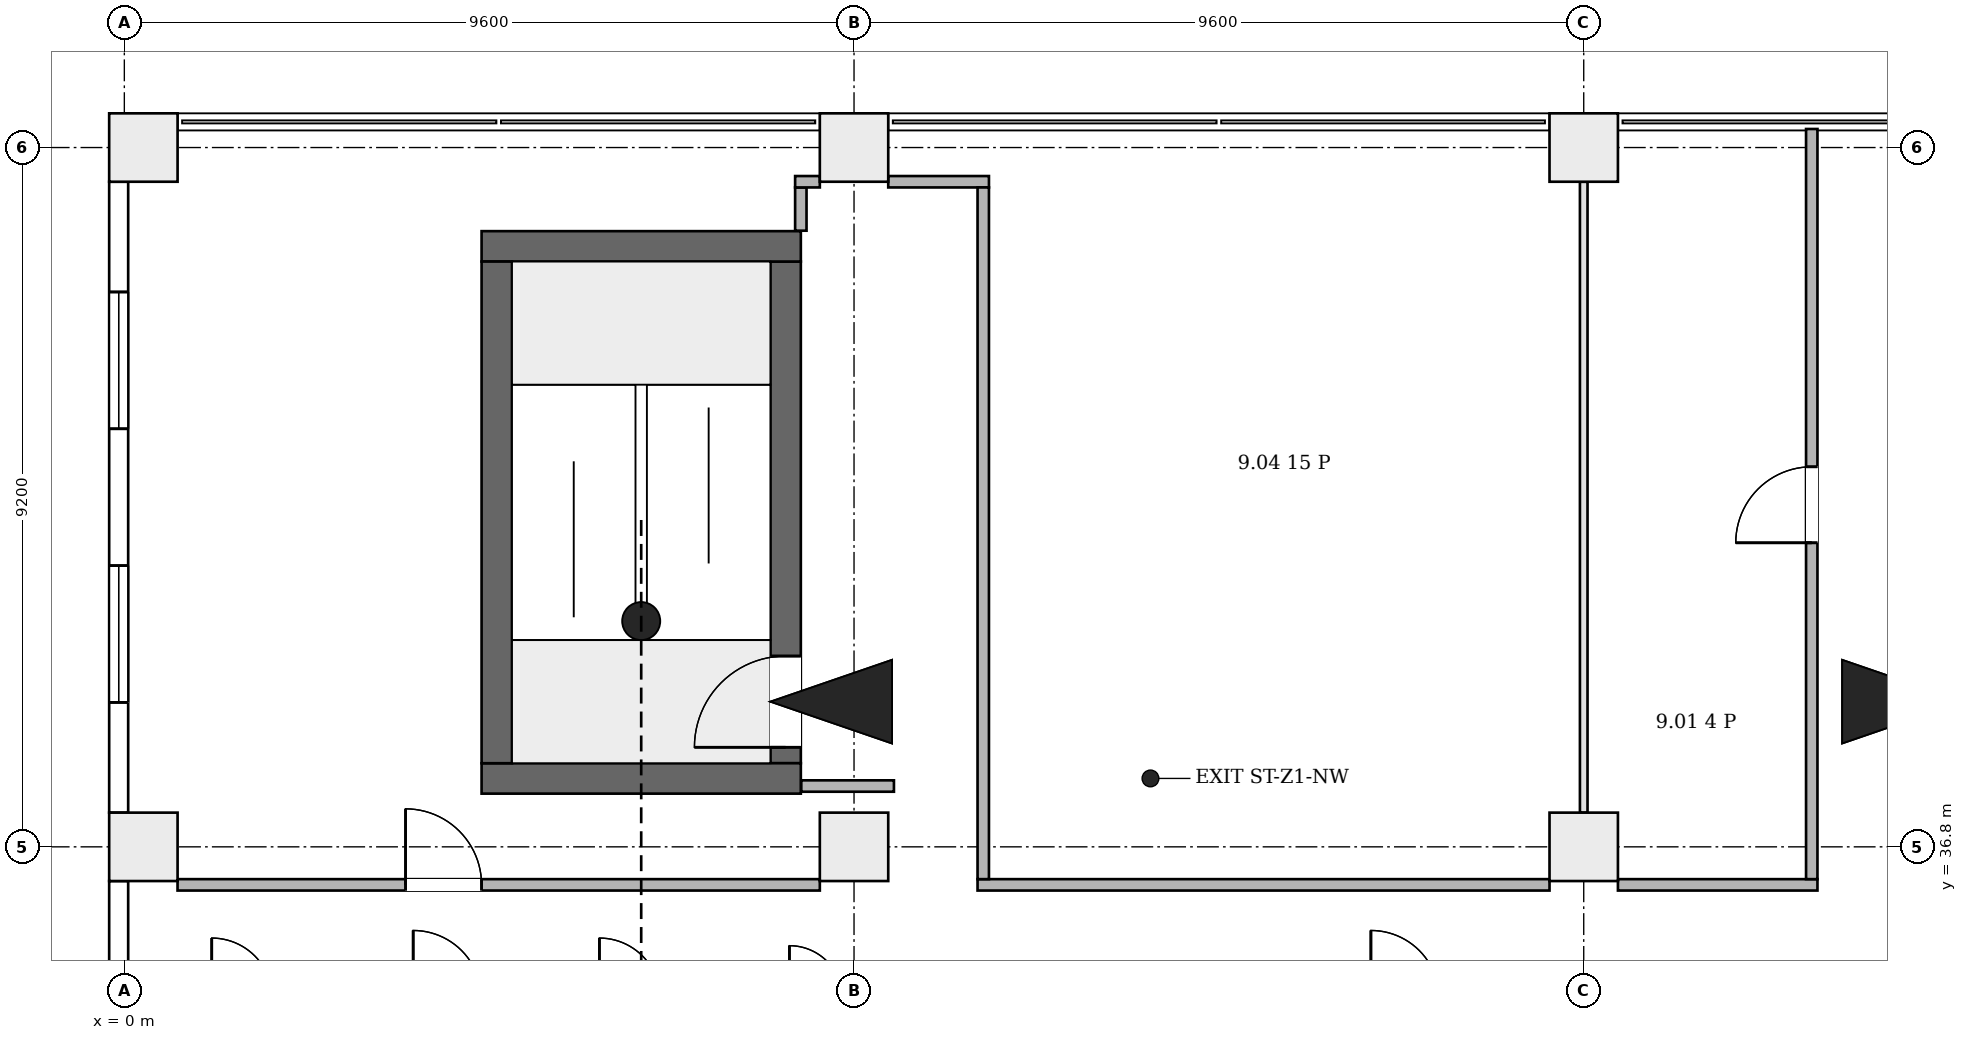
"""IFC4 building model, lengths in metres.
Left out: names, types, materials, properties, quantities, classifications, styles, units other than length and angle.
Written with IfcOpenShell. Run it as: python <this file> out.ifc"""

import sys

from ifc_helpers import new_model, si_unit, direction, frame, frame_2d, origin, origin_2d, place, context, subcontext, project, spatial, rectangle, extrude, element, fill, save


model = new_model("IFC4")
c1 = context("Model", 3, precision=1e-05, world=origin(), true_north=direction((0.0, 1.0)))
c2 = subcontext(c1, "Body", "Model", "MODEL_VIEW")
j1 = project(units=[si_unit("LENGTHUNIT", "METRE"), si_unit("PLANEANGLEUNIT", "RADIAN")], contexts=[c1])
p1 = place(None, origin())
s1 = spatial("IfcSite", under=j1, at=p1, CompositionType="ELEMENT")
p2 = place(p1, origin())
s2 = spatial("IfcBuilding", under=s1, at=p2, CompositionType="ELEMENT")
p3 = place(p2, frame((0.0, 0.0, 48.7)))
s3 = spatial("IfcBuildingStorey", under=s2, at=p3, CompositionType="ELEMENT", Elevation=48.7)
for number, where, z_axis, x_axis in (
    (1, (4.7, 37.7, 0.0), (0.0, 0.0, 1.0), (1.0, 0.0, 0.0)),
    (2, (4.7, 44.7, 0.0), (0.0, 0.0, 1.0), (1.0, 0.0, 0.0)),
):
    element("IfcWall", number, at=place(p3, frame(where, z_axis=z_axis, x_axis=x_axis)), inside=s3, PredefinedType="SHEAR", context=c2, shape_type="SweptSolid", body=[
        extrude(rectangle(XDim=4.2, YDim=0.4, at=frame_2d((2.1, 0.0))), origin(), (0.0, 0.0, 1.0), 4.2),
    ])
p4 = place(p3, frame((4.9, 37.9, 0.0), z_axis=(0.0, 0.0, 1.0), x_axis=(0.0, 1.0, 0.0)))
e3 = element("IfcWall", 3, at=p4, inside=s3, PredefinedType="SHEAR", context=c2, shape_type="SweptSolid", body=[
    extrude(rectangle(XDim=6.6, YDim=0.4, at=frame_2d((3.3, 0.0))), origin(), (0.0, 0.0, 1.0), 4.2),
])
p5 = place(p3, frame((8.7, 37.9, 0.0), z_axis=(0.0, 0.0, 1.0), x_axis=(0.0, 1.0, 0.0)))
e4 = element("IfcWall", 4, at=p5, inside=s3, PredefinedType="SHEAR", context=c2, shape_type="SweptSolid", body=[
    extrude(rectangle(XDim=6.6, YDim=0.4, at=frame_2d((3.3, 0.0))), origin(), (0.0, 0.0, 1.0), 4.2),
])
p6 = place(p5, frame((0.21, 0.0, 0.0)))
e5 = element("IfcOpeningElement", 5, at=p6, cuts=e4, PredefinedType="OPENING", context=c2, shape_type="SweptSolid", body=[
    extrude(rectangle(XDim=1.2, YDim=2.1, at=frame_2d((0.6, 1.05))), frame((0.0, 0.21, 0.0), z_axis=(0.0, -1.0, 0.0), x_axis=(1.0, 0.0, 0.0)), (0.0, 0.0, 1.0), 0.42),
])
for number, where, z_axis, x_axis in (
    (6, (0.25, 36.8, 0.0), (0.0, 0.0, 1.0), (1.0, 0.0, 0.0)),
    (7, (9.6, 36.8, 0.0), (0.0, 0.0, 1.0), (1.0, 0.0, 0.0)),
    (8, (19.2, 36.8, 0.0), (0.0, 0.0, 1.0), (1.0, 0.0, 0.0)),
    (9, (0.25, 46.0, 0.0), (0.0, 0.0, 1.0), (1.0, 0.0, 0.0)),
    (10, (9.6, 46.0, 0.0), (0.0, 0.0, 1.0), (1.0, 0.0, 0.0)),
    (11, (19.2, 46.0, 0.0), (0.0, 0.0, 1.0), (1.0, 0.0, 0.0)),
):
    element("IfcColumn", number, at=place(p3, frame(where, z_axis=z_axis, x_axis=x_axis)), inside=s3, PredefinedType="COLUMN", context=c2, shape_type="SweptSolid", body=[
        extrude(rectangle(XDim=0.9, YDim=0.9, at=origin_2d()), origin(), (0.0, 0.0, 1.0), 4.2),
    ])
p7 = place(p3, frame((-0.074, 36.35, 0.0), z_axis=(0.0, 0.0, 1.0), x_axis=(0.0, -1.0, 0.0)))
e12 = element("IfcWall", 12, at=p7, inside=s3, PredefinedType="ELEMENTEDWALL", context=c2, shape_type="SweptSolid", body=[
    extrude(rectangle(XDim=8.3, YDim=0.25, at=frame_2d((4.15, 0.0))), origin(), (0.0, 0.0, 1.0), 3.9),
])
p8 = place(p7, frame((5.05, 0.0, 0.9)))
e13 = element("IfcOpeningElement", 13, at=p8, cuts=e12, PredefinedType="OPENING", context=c2, shape_type="SweptSolid", body=[
    extrude(rectangle(XDim=1.8, YDim=2.6, at=frame_2d((0.9, 1.3))), frame((0.0, 0.135, 0.0), z_axis=(0.0, -1.0, 0.0), x_axis=(1.0, 0.0, 0.0)), (0.0, 0.0, 1.0), 0.27),
])
p9 = place(p7, frame((1.7, 0.0, 0.9)))
e14 = element("IfcOpeningElement", 14, at=p9, cuts=e12, PredefinedType="OPENING", context=c2, shape_type="SweptSolid", body=[
    extrude(rectangle(XDim=1.8, YDim=2.6, at=frame_2d((0.9, 1.3))), frame((0.0, 0.135, 0.0), z_axis=(0.0, -1.0, 0.0), x_axis=(1.0, 0.0, 0.0)), (0.0, 0.0, 1.0), 0.27),
])
p10 = place(p3, frame((-0.074, 45.55, 0.0), z_axis=(0.0, 0.0, 1.0), x_axis=(0.0, -1.0, 0.0)))
e15 = element("IfcWall", 15, at=p10, inside=s3, PredefinedType="ELEMENTEDWALL", context=c2, shape_type="SweptSolid", body=[
    extrude(rectangle(XDim=8.3, YDim=0.25, at=frame_2d((4.15, 0.0))), origin(), (0.0, 0.0, 1.0), 3.9),
])
p11 = place(p10, frame((5.05, 0.0, 0.9)))
e16 = element("IfcOpeningElement", 16, at=p11, cuts=e15, PredefinedType="OPENING", context=c2, shape_type="SweptSolid", body=[
    extrude(rectangle(XDim=1.8, YDim=2.6, at=frame_2d((0.9, 1.3))), frame((0.0, 0.135, 0.0), z_axis=(0.0, -1.0, 0.0), x_axis=(1.0, 0.0, 0.0)), (0.0, 0.0, 1.0), 0.27),
])
p12 = place(p10, frame((1.45, 0.0, 0.9)))
e17 = element("IfcOpeningElement", 17, at=p12, cuts=e15, PredefinedType="OPENING", context=c2, shape_type="SweptSolid", body=[
    extrude(rectangle(XDim=1.8, YDim=2.6, at=frame_2d((0.9, 1.3))), frame((0.0, 0.135, 0.0), z_axis=(0.0, -1.0, 0.0), x_axis=(1.0, 0.0, 0.0)), (0.0, 0.0, 1.0), 0.27),
])
p13 = place(p3, frame((0.7, 36.3, 0.0), z_axis=(0.0, 0.0, 1.0), x_axis=(1.0, 0.0, 0.0)))
e18 = element("IfcWall", 18, at=p13, inside=s3, PredefinedType="PARTITIONING", context=c2, shape_type="SweptSolid", body=[
    extrude(rectangle(XDim=8.45, YDim=0.15, at=frame_2d((4.225, 0.0))), origin(), (0.0, 0.0, 1.0), 3.9),
])
p14 = place(p13, frame((3.0, 0.0, 0.0)))
e19 = element("IfcOpeningElement", 19, at=p14, cuts=e18, PredefinedType="OPENING", context=c2, shape_type="SweptSolid", body=[
    extrude(rectangle(XDim=1.0, YDim=2.1, at=frame_2d((0.5, 1.05))), frame((0.0, 0.085, 0.0), z_axis=(0.0, -1.0, 0.0), x_axis=(1.0, 0.0, 0.0)), (0.0, 0.0, 1.0), 0.17),
])
p15 = place(p3, frame((8.9, 44.906, 0.0), z_axis=(0.0, 0.0, 1.0), x_axis=(0.0, 1.0, 0.0)))
e20 = element("IfcWall", 20, at=p15, inside=s3, PredefinedType="PARTITIONING", context=c2, shape_type="SweptSolid", body=[
    extrude(rectangle(XDim=0.569, YDim=0.15, at=frame_2d((0.285, 0.0))), origin(), (0.0, 0.0, 1.0), 3.9),
])
p16 = place(p3, frame((8.825, 45.55, 0.0), z_axis=(0.0, 0.0, 1.0), x_axis=(1.0, 0.0, 0.0)))
e21 = element("IfcWall", 21, at=p16, inside=s3, PredefinedType="PARTITIONING", context=c2, shape_type="SweptSolid", body=[
    extrude(rectangle(XDim=0.325, YDim=0.15, at=frame_2d((0.163, 0.0))), origin(), (0.0, 0.0, 1.0), 3.9),
])
p17 = place(p3, frame((8.906, 37.6, 0.0), z_axis=(0.0, 0.0, 1.0), x_axis=(1.0, 0.0, 0.0)))
e22 = element("IfcWall", 22, at=p17, inside=s3, PredefinedType="PARTITIONING", context=c2, shape_type="SweptSolid", body=[
    extrude(rectangle(XDim=1.219, YDim=0.15, at=frame_2d((0.609, 0.0))), origin(), (0.0, 0.0, 1.0), 3.9),
])
p18 = place(p3, frame((10.05, 45.55, 0.0), z_axis=(0.0, 0.0, 1.0), x_axis=(1.0, 0.0, 0.0)))
e23 = element("IfcWall", 23, at=p18, inside=s3, PredefinedType="PARTITIONING", context=c2, shape_type="SweptSolid", body=[
    extrude(rectangle(XDim=1.325, YDim=0.15, at=frame_2d((0.663, 0.0))), origin(), (0.0, 0.0, 1.0), 3.9),
])
p19 = place(p3, frame((11.225, 36.3, 0.0), z_axis=(0.0, 0.0, 1.0), x_axis=(1.0, 0.0, 0.0)))
e24 = element("IfcWall", 24, at=p19, inside=s3, PredefinedType="PARTITIONING", context=c2, shape_type="SweptSolid", body=[
    extrude(rectangle(XDim=7.525, YDim=0.15, at=frame_2d((3.762, 0.0))), origin(), (0.0, 0.0, 1.0), 3.9),
])
p20 = place(p3, frame((11.3, 36.375, 0.0), z_axis=(0.0, 0.0, 1.0), x_axis=(0.0, 1.0, 0.0)))
e25 = element("IfcWall", 25, at=p20, inside=s3, PredefinedType="PARTITIONING", context=c2, shape_type="SweptSolid", body=[
    extrude(rectangle(XDim=9.1, YDim=0.15, at=frame_2d((4.55, 0.0))), origin(), (0.0, 0.0, 1.0), 3.9),
])
p21 = place(p3, frame((19.2, 37.25, 0.0), z_axis=(0.0, 0.0, 1.0), x_axis=(0.0, 1.0, 0.0)))
e26 = element("IfcWall", 26, at=p21, inside=s3, PredefinedType="PARTITIONING", context=c2, shape_type="SweptSolid", body=[
    extrude(rectangle(XDim=8.3, YDim=0.1, at=frame_2d((4.15, 0.0))), origin(), (0.0, 0.0, 1.0), 3.9),
])
p22 = place(p3, frame((19.65, 36.3, 0.0), z_axis=(0.0, 0.0, 1.0), x_axis=(1.0, 0.0, 0.0)))
e27 = element("IfcWall", 27, at=p22, inside=s3, PredefinedType="PARTITIONING", context=c2, shape_type="SweptSolid", body=[
    extrude(rectangle(XDim=2.625, YDim=0.15, at=frame_2d((1.312, 0.0))), origin(), (0.0, 0.0, 1.0), 3.9),
])
p23 = place(p3, frame((22.2, 36.375, 0.0), z_axis=(0.0, 0.0, 1.0), x_axis=(0.0, 1.0, 0.0)))
e28 = element("IfcWall", 28, at=p23, inside=s3, PredefinedType="PARTITIONING", context=c2, shape_type="SweptSolid", body=[
    extrude(rectangle(XDim=9.869, YDim=0.15, at=frame_2d((4.935, 0.0))), origin(), (0.0, 0.0, 1.0), 3.9),
])
p24 = place(p23, frame((4.425, 0.0, 0.0)))
e29 = element("IfcOpeningElement", 29, at=p24, cuts=e28, PredefinedType="OPENING", context=c2, shape_type="SweptSolid", body=[
    extrude(rectangle(XDim=1.0, YDim=2.1, at=frame_2d((0.5, 1.05))), frame((0.0, 0.085, 0.0), z_axis=(0.0, -1.0, 0.0), x_axis=(1.0, 0.0, 0.0)), (0.0, 0.0, 1.0), 0.17),
])
p25 = place(p11, origin())
e30 = element("IfcWindow", 30, at=p25, inside=s3, PartitioningType="SINGLE_PANEL", PredefinedType="WINDOW", context=c2, shape_type="SweptSolid", body=[
    extrude(rectangle(XDim=1.8, YDim=2.6, at=frame_2d((0.9, 1.3))), frame((0.0, 0.03, 0.0), z_axis=(0.0, -1.0, 0.0), x_axis=(1.0, 0.0, 0.0)), (0.0, 0.0, 1.0), 0.06),
])
fill(e16, e30)
p26 = place(p12, origin())
e31 = element("IfcWindow", 31, at=p26, inside=s3, PartitioningType="SINGLE_PANEL", PredefinedType="WINDOW", context=c2, shape_type="SweptSolid", body=[
    extrude(rectangle(XDim=1.8, YDim=2.6, at=frame_2d((0.9, 1.3))), frame((0.0, 0.03, 0.0), z_axis=(0.0, -1.0, 0.0), x_axis=(1.0, 0.0, 0.0)), (0.0, 0.0, 1.0), 0.06),
])
fill(e17, e31)
p27 = place(p6, origin())
e32 = element("IfcDoor", 32, at=p27, inside=s3, OperationType="SINGLE_SWING_RIGHT", PredefinedType="DOOR", context=c2, shape_type="SweptSolid", body=[
    extrude(rectangle(XDim=1.2, YDim=2.1, at=frame_2d((0.6, 1.05))), frame((0.0, 0.025, 0.0), z_axis=(0.0, -1.0, 0.0), x_axis=(1.0, 0.0, 0.0)), (0.0, 0.0, 1.0), 0.05),
])
fill(e5, e32)
p28 = place(p14, origin())
e33 = element("IfcDoor", 33, at=p28, inside=s3, OperationType="SINGLE_SWING_RIGHT", PredefinedType="DOOR", context=c2, shape_type="SweptSolid", body=[
    extrude(rectangle(XDim=1.0, YDim=2.1, at=frame_2d((0.5, 1.05))), frame((0.0, 0.025, 0.0), z_axis=(0.0, -1.0, 0.0), x_axis=(1.0, 0.0, 0.0)), (0.0, 0.0, 1.0), 0.05),
])
fill(e19, e33)
p29 = place(p24, origin())
e34 = element("IfcDoor", 34, at=p29, inside=s3, OperationType="SINGLE_SWING_RIGHT", PredefinedType="DOOR", context=c2, shape_type="SweptSolid", body=[
    extrude(rectangle(XDim=1.0, YDim=2.1, at=frame_2d((0.5, 1.05))), frame((0.0, 0.025, 0.0), z_axis=(0.0, -1.0, 0.0), x_axis=(1.0, 0.0, 0.0)), (0.0, 0.0, 1.0), 0.05),
])
fill(e29, e34)
save(model, sys.argv[1])
